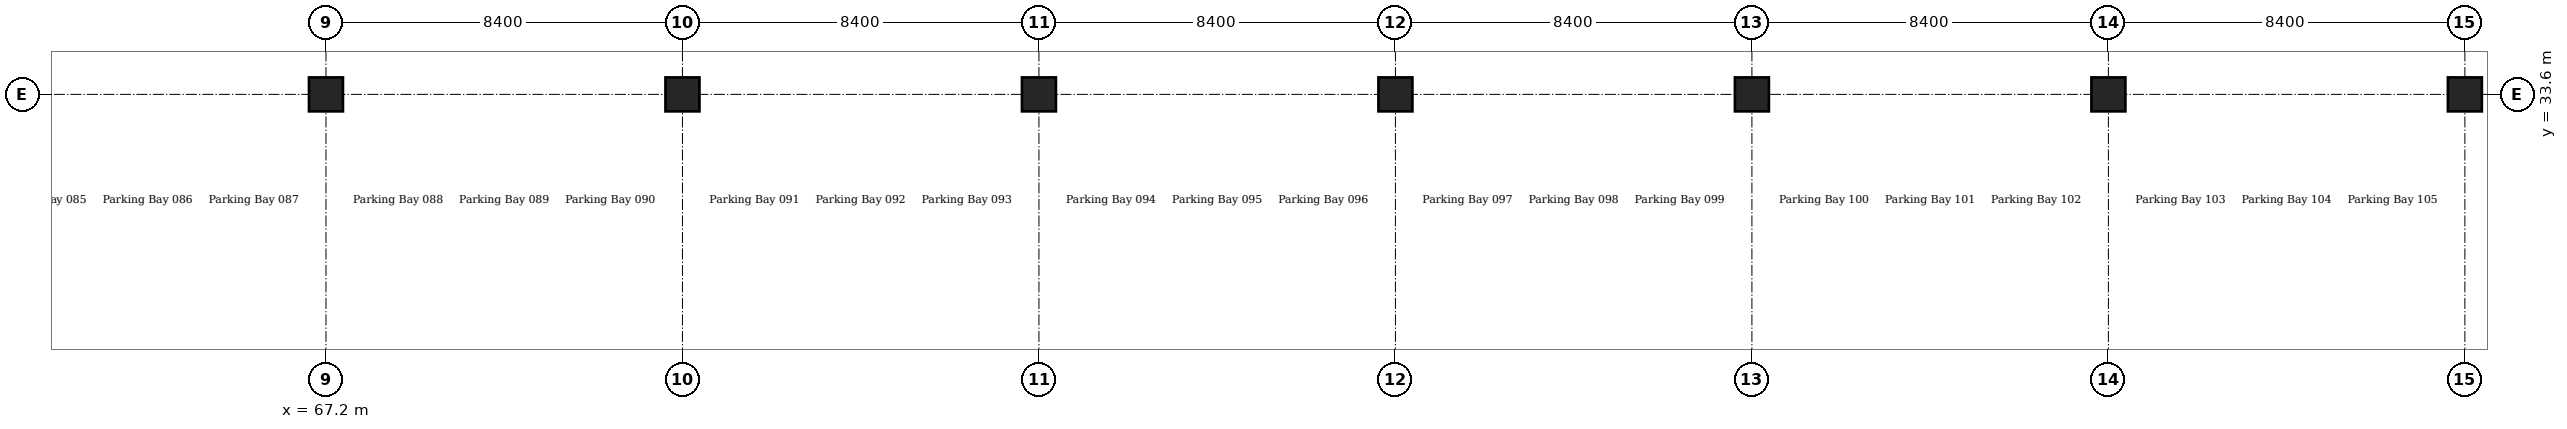
"""IFC4 building model, lengths in metres.
Left out: names, types, materials, properties, quantities, classifications, styles, units other than length and angle.
Written with IfcOpenShell. Run it as: python <this file> out.ifc"""

import sys

from ifc_helpers import new_model, si_unit, direction, frame, origin, origin_2d, place, context, subcontext, project, spatial, rectangle, extrude, element, save


model = new_model("IFC4")
c1 = context("Model", 3, precision=1e-05, world=origin(), true_north=direction((0.0, 1.0)))
c2 = subcontext(c1, "Body", "Model", "MODEL_VIEW")
j1 = project(units=[si_unit("LENGTHUNIT", "METRE"), si_unit("PLANEANGLEUNIT", "RADIAN")], contexts=[c1])
p1 = place(None, origin())
s1 = spatial("IfcSite", under=j1, at=p1, CompositionType="ELEMENT")
p2 = place(p1, origin())
s2 = spatial("IfcBuilding", under=s1, at=p2, CompositionType="ELEMENT")
p3 = place(p2, frame((0.0, 0.0, -5.4)))
s3 = spatial("IfcBuildingStorey", under=s2, at=p3, CompositionType="ELEMENT", Elevation=-5.4)
for number, where, z_axis, x_axis in (
    (1, (67.2, 33.6, 0.0), (0.0, 0.0, 1.0), (1.0, 0.0, 0.0)),
    (2, (75.6, 33.6, 0.0), (0.0, 0.0, 1.0), (1.0, 0.0, 0.0)),
    (3, (84.0, 33.6, 0.0), (0.0, 0.0, 1.0), (1.0, 0.0, 0.0)),
    (4, (92.4, 33.6, 0.0), (0.0, 0.0, 1.0), (1.0, 0.0, 0.0)),
    (5, (100.8, 33.6, 0.0), (0.0, 0.0, 1.0), (1.0, 0.0, 0.0)),
    (6, (109.2, 33.6, 0.0), (0.0, 0.0, 1.0), (1.0, 0.0, 0.0)),
    (7, (117.6, 33.6, 0.0), (0.0, 0.0, 1.0), (1.0, 0.0, 0.0)),
):
    element("IfcColumn", number, at=place(p3, frame(where, z_axis=z_axis, x_axis=x_axis)), inside=s3, PredefinedType="COLUMN", context=c2, shape_type="SweptSolid", body=[
        extrude(rectangle(XDim=0.8, YDim=0.8, at=origin_2d()), origin(), (0.0, 0.0, 1.0), 5.4),
    ])
save(model, sys.argv[1])
